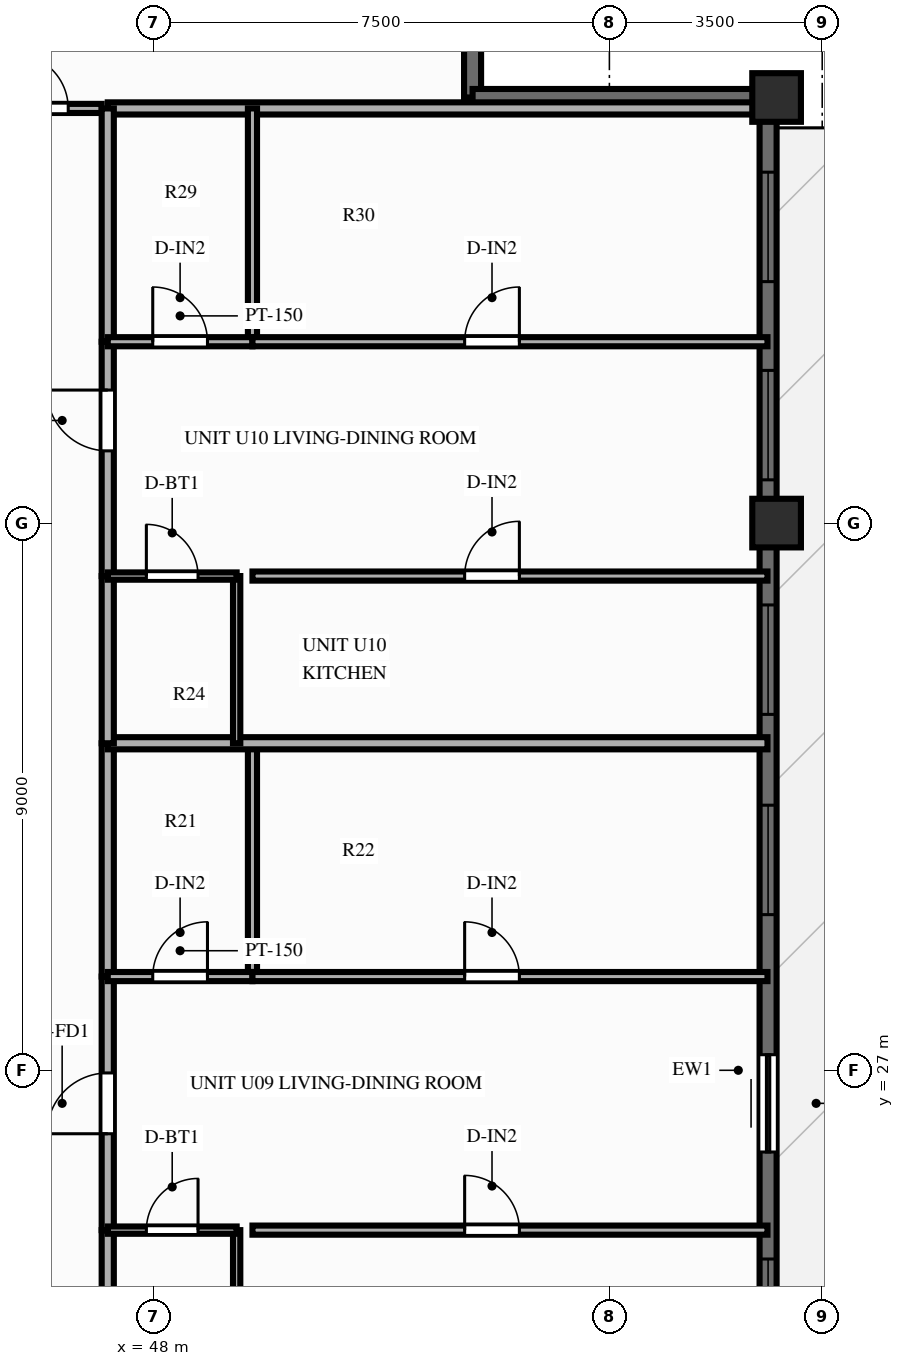
"""IFC4 building model, lengths in metres.
Left out: names, types, materials, properties, quantities, classifications, styles, units other than length and angle.
Written with IfcOpenShell. Run it as: python <this file> out.ifc"""

import sys

from ifc_helpers import new_model, si_unit, direction, frame, frame_2d, origin, origin_2d, place, context, subcontext, project, spatial, rectangle, extrude, source, transform, mapped, element, fill, save


model = new_model("IFC4")
c1 = context("Model", 3, precision=1e-05, world=origin(), true_north=direction((0.0, 1.0)))
c2 = subcontext(c1, "Body", "Model", "MODEL_VIEW")
j1 = project(units=[si_unit("LENGTHUNIT", "METRE"), si_unit("PLANEANGLEUNIT", "RADIAN")], contexts=[c1])
p1 = place(None, origin())
s1 = spatial("IfcSite", under=j1, at=p1, CompositionType="ELEMENT")
p2 = place(p1, origin())
s2 = spatial("IfcBuilding", under=s1, at=p2, CompositionType="ELEMENT")
p3 = place(p2, frame((0.0, 0.0, 172.9)))
s3 = spatial("IfcBuildingStorey", under=s2, at=p3, CompositionType="ELEMENT", Elevation=172.9)
m1 = source(origin(), c2, "Body", "SweptSolid", [
    extrude(rectangle(XDim=0.8, YDim=0.8, at=origin_2d()), origin(), (0.0, 0.0, 1.0), 3.9),
])
for number, where, z_axis, x_axis in (
    (1, (58.25, 36.0, 0.0), (0.0, 0.0, 1.0), (1.0, 0.0, 0.0)),
    (2, (58.25, 43.0, 0.0), (0.0, 0.0, 1.0), (1.0, 0.0, 0.0)),
):
    element("IfcColumn", number, at=place(p3, frame(where, z_axis=z_axis, x_axis=x_axis)), inside=s3, PredefinedType="COLUMN", context=c2, shape_type="MappedRepresentation", body=[
        mapped(m1, transform((0.0, 0.0, 0.0), scale=1.0)),
    ])
p4 = place(p3, frame((58.11, 11.0, 0.0), z_axis=(0.0, 0.0, 1.0), x_axis=(0.0, 1.0, 0.0)))
e3 = element("IfcWall", 3, at=p4, inside=s3, PredefinedType="SOLIDWALL", context=c2, shape_type="SweptSolid", body=[
    extrude(rectangle(XDim=32.0, YDim=0.28, at=frame_2d((16.0, 0.0))), origin(), (0.0, 0.0, 1.0), 2.79),
])
p5 = place(p4, frame((0.685, 0.0, 0.85)))
e4 = element("IfcOpeningElement", 4, at=p5, cuts=e3, PredefinedType="OPENING", context=c2, shape_type="SweptSolid", body=[
    extrude(rectangle(XDim=1.8, YDim=1.65, at=frame_2d((0.9, 0.825))), frame((0.0, 0.152, 0.0), z_axis=(0.0, -1.0, 0.0), x_axis=(1.0, 0.0, 0.0)), (0.0, 0.0, 1.0), 0.304),
])
p6 = place(p4, frame((3.945, 0.0, 0.85)))
e5 = element("IfcOpeningElement", 5, at=p6, cuts=e3, PredefinedType="OPENING", context=c2, shape_type="SweptSolid", body=[
    extrude(rectangle(XDim=1.8, YDim=1.65, at=frame_2d((0.9, 0.825))), frame((0.0, 0.152, 0.0), z_axis=(0.0, -1.0, 0.0), x_axis=(1.0, 0.0, 0.0)), (0.0, 0.0, 1.0), 0.304),
])
p7 = place(p4, frame((8.051, 0.0, 0.85)))
e6 = element("IfcOpeningElement", 6, at=p7, cuts=e3, PredefinedType="OPENING", context=c2, shape_type="SweptSolid", body=[
    extrude(rectangle(XDim=1.8, YDim=1.65, at=frame_2d((0.9, 0.825))), frame((0.0, 0.152, 0.0), z_axis=(0.0, -1.0, 0.0), x_axis=(1.0, 0.0, 0.0)), (0.0, 0.0, 1.0), 0.304),
])
p8 = place(p4, frame((11.096, 0.0, 0.85)))
e7 = element("IfcOpeningElement", 7, at=p8, cuts=e3, PredefinedType="OPENING", context=c2, shape_type="SweptSolid", body=[
    extrude(rectangle(XDim=1.8, YDim=1.65, at=frame_2d((0.9, 0.825))), frame((0.0, 0.152, 0.0), z_axis=(0.0, -1.0, 0.0), x_axis=(1.0, 0.0, 0.0)), (0.0, 0.0, 1.0), 0.304),
])
p9 = place(p4, frame((16.257, 0.0, 0.0), z_axis=(0.0, 0.0, 1.0), x_axis=(-1.0, 0.0, 0.0)))
e8 = element("IfcOpeningElement", 8, at=p9, cuts=e3, PredefinedType="OPENING", context=c2, shape_type="SweptSolid", body=[
    extrude(rectangle(XDim=1.6, YDim=2.15, at=frame_2d((0.8, 1.075))), frame((0.0, 0.152, 0.0), z_axis=(0.0, -1.0, 0.0), x_axis=(1.0, 0.0, 0.0)), (0.0, 0.0, 1.0), 0.304),
])
p10 = place(p4, frame((18.56, 0.0, 0.85)))
e9 = element("IfcOpeningElement", 9, at=p10, cuts=e3, PredefinedType="OPENING", context=c2, shape_type="SweptSolid", body=[
    extrude(rectangle(XDim=1.8, YDim=1.65, at=frame_2d((0.9, 0.825))), frame((0.0, 0.152, 0.0), z_axis=(0.0, -1.0, 0.0), x_axis=(1.0, 0.0, 0.0)), (0.0, 0.0, 1.0), 0.304),
])
p11 = place(p4, frame((21.854, 0.0, 0.85)))
e10 = element("IfcOpeningElement", 10, at=p11, cuts=e3, PredefinedType="OPENING", context=c2, shape_type="SweptSolid", body=[
    extrude(rectangle(XDim=1.8, YDim=1.65, at=frame_2d((0.9, 0.825))), frame((0.0, 0.152, 0.0), z_axis=(0.0, -1.0, 0.0), x_axis=(1.0, 0.0, 0.0)), (0.0, 0.0, 1.0), 0.304),
])
p12 = place(p4, frame((25.711, 0.0, 0.85)))
e11 = element("IfcOpeningElement", 11, at=p12, cuts=e3, PredefinedType="OPENING", context=c2, shape_type="SweptSolid", body=[
    extrude(rectangle(XDim=1.8, YDim=1.65, at=frame_2d((0.9, 0.825))), frame((0.0, 0.152, 0.0), z_axis=(0.0, -1.0, 0.0), x_axis=(1.0, 0.0, 0.0)), (0.0, 0.0, 1.0), 0.304),
])
p13 = place(p4, frame((28.971, 0.0, 0.85)))
e12 = element("IfcOpeningElement", 12, at=p13, cuts=e3, PredefinedType="OPENING", context=c2, shape_type="SweptSolid", body=[
    extrude(rectangle(XDim=1.8, YDim=1.65, at=frame_2d((0.9, 0.825))), frame((0.0, 0.152, 0.0), z_axis=(0.0, -1.0, 0.0), x_axis=(1.0, 0.0, 0.0)), (0.0, 0.0, 1.0), 0.304),
])
for number, where, z_axis, x_axis in (
    (13, (53.25, 43.0, 0.0), (0.0, 0.0, 1.0), (0.0, 1.0, 0.0)),
    (14, (53.25, 43.0, 0.0), (0.0, 0.0, 1.0), (1.0, 0.0, 0.0)),
):
    element("IfcWall", number, at=place(p3, frame(where, z_axis=z_axis, x_axis=x_axis)), inside=s3, PredefinedType="SOLIDWALL", context=c2, shape_type="SweptSolid", body=[
        extrude(rectangle(XDim=4.92, YDim=0.28, at=frame_2d((2.46, 0.0))), origin(), (0.0, 0.0, 1.0), 2.79),
    ])
p14 = place(p3, frame((44.82, 42.82, 0.0), z_axis=(0.0, 0.0, 1.0), x_axis=(1.0, 0.0, 0.0)))
e15 = element("IfcWall", 15, at=p14, inside=s3, PredefinedType="PARTITIONING", context=c2, shape_type="SweptSolid", body=[
    extrude(rectangle(XDim=2.33, YDim=0.15, at=frame_2d((1.165, 0.0))), origin(), (0.0, 0.0, 1.0), 3.69),
])
p15 = place(p14, frame((0.88, 0.0, 0.0)))
e16 = element("IfcOpeningElement", 16, at=p15, cuts=e15, PredefinedType="OPENING", context=c2, shape_type="SweptSolid", body=[
    extrude(rectangle(XDim=0.9, YDim=2.1, at=frame_2d((0.45, 1.05))), frame((0.0, 0.087, 0.0), z_axis=(0.0, -1.0, 0.0), x_axis=(1.0, 0.0, 0.0)), (0.0, 0.0, 1.0), 0.174),
])
p16 = place(p3, frame((47.25, 42.82, 0.0), z_axis=(0.0, 0.0, 1.0), x_axis=(1.0, 0.0, 0.0)))
e17 = element("IfcWall", 17, at=p16, inside=s3, PredefinedType="PARTITIONING", context=c2, shape_type="SweptSolid", body=[
    extrude(rectangle(XDim=10.85, YDim=0.2, at=frame_2d((5.425, 0.0))), origin(), (0.0, 0.0, 1.0), 3.69),
])
p17 = place(p3, frame((47.25, 21.621, 0.0), z_axis=(0.0, 0.0, 1.0), x_axis=(0.0, 1.0, 0.0)))
e18 = element("IfcWall", 18, at=p17, inside=s3, PredefinedType="PARTITIONING", context=c2, shape_type="SweptSolid", body=[
    extrude(rectangle(XDim=2.75, YDim=0.2, at=frame_2d((1.375, 0.0))), origin(), (0.0, 0.0, 1.0), 3.69),
])
p18 = place(p3, frame((47.25, 24.371, 0.0), z_axis=(0.0, 0.0, 1.0), x_axis=(0.0, 1.0, 0.0)))
e19 = element("IfcWall", 19, at=p18, inside=s3, PredefinedType="PARTITIONING", context=c2, shape_type="SweptSolid", body=[
    extrude(rectangle(XDim=4.171, YDim=0.2, at=frame_2d((2.085, 0.0))), origin(), (0.0, 0.0, 1.0), 3.69),
])
p19 = place(p18, frame((1.585, 0.0, 0.0)))
e20 = element("IfcOpeningElement", 20, at=p19, cuts=e19, PredefinedType="OPENING", context=c2, shape_type="SweptSolid", body=[
    extrude(rectangle(XDim=1.0, YDim=2.15, at=frame_2d((0.5, 1.075))), frame((0.0, 0.112, 0.0), z_axis=(0.0, -1.0, 0.0), x_axis=(1.0, 0.0, 0.0)), (0.0, 0.0, 1.0), 0.224),
])
p20 = place(p3, frame((47.25, 28.542, 0.0), z_axis=(0.0, 0.0, 1.0), x_axis=(0.0, 1.0, 0.0)))
e21 = element("IfcWall", 21, at=p20, inside=s3, PredefinedType="PARTITIONING", context=c2, shape_type="SweptSolid", body=[
    extrude(rectangle(XDim=3.837, YDim=0.2, at=frame_2d((1.918, 0.0))), origin(), (0.0, 0.0, 1.0), 3.69),
])
p21 = place(p3, frame((49.37, 21.621, 0.0), z_axis=(0.0, 0.0, 1.0), x_axis=(0.0, 1.0, 0.0)))
e22 = element("IfcWall", 22, at=p21, inside=s3, PredefinedType="PARTITIONING", context=c2, shape_type="SweptSolid", body=[
    extrude(rectangle(XDim=2.75, YDim=0.12, at=frame_2d((1.375, 0.0))), origin(), (0.0, 0.0, 1.0), 3.69),
])
p22 = place(p3, frame((49.63, 28.542, 0.0), z_axis=(0.0, 0.0, 1.0), x_axis=(0.0, 1.0, 0.0)))
e23 = element("IfcWall", 23, at=p22, inside=s3, PredefinedType="PARTITIONING", context=c2, shape_type="SweptSolid", body=[
    extrude(rectangle(XDim=3.837, YDim=0.15, at=frame_2d((1.918, 0.0))), origin(), (0.0, 0.0, 1.0), 3.69),
])
p23 = place(p3, frame((47.25, 24.371, 0.0), z_axis=(0.0, 0.0, 1.0), x_axis=(1.0, 0.0, 0.0)))
e24 = element("IfcWall", 24, at=p23, inside=s3, PredefinedType="PARTITIONING", context=c2, shape_type="SweptSolid", body=[
    extrude(rectangle(XDim=2.12, YDim=0.12, at=frame_2d((1.06, 0.0))), origin(), (0.0, 0.0, 1.0), 3.69),
])
p24 = place(p23, frame((0.635, 0.0, 0.0)))
e25 = element("IfcOpeningElement", 25, at=p24, cuts=e24, PredefinedType="OPENING", context=c2, shape_type="SweptSolid", body=[
    extrude(rectangle(XDim=0.85, YDim=2.05, at=frame_2d((0.425, 1.025))), frame((0.0, 0.072, 0.0), z_axis=(0.0, -1.0, 0.0), x_axis=(1.0, 0.0, 0.0)), (0.0, 0.0, 1.0), 0.144),
])
p25 = place(p3, frame((49.63, 24.371, 0.0), z_axis=(0.0, 0.0, 1.0), x_axis=(1.0, 0.0, 0.0)))
e26 = element("IfcWall", 26, at=p25, inside=s3, PredefinedType="PARTITIONING", context=c2, shape_type="SweptSolid", body=[
    extrude(rectangle(XDim=8.47, YDim=0.15, at=frame_2d((4.235, 0.0))), origin(), (0.0, 0.0, 1.0), 3.69),
])
p26 = place(p25, frame((3.49, 0.0, 0.0)))
e27 = element("IfcOpeningElement", 27, at=p26, cuts=e26, PredefinedType="OPENING", context=c2, shape_type="SweptSolid", body=[
    extrude(rectangle(XDim=0.9, YDim=2.1, at=frame_2d((0.45, 1.05))), frame((0.0, 0.087, 0.0), z_axis=(0.0, -1.0, 0.0), x_axis=(1.0, 0.0, 0.0)), (0.0, 0.0, 1.0), 0.174),
])
p27 = place(p3, frame((47.25, 28.542, 0.0), z_axis=(0.0, 0.0, 1.0), x_axis=(1.0, 0.0, 0.0)))
e28 = element("IfcWall", 28, at=p27, inside=s3, PredefinedType="PARTITIONING", context=c2, shape_type="SweptSolid", body=[
    extrude(rectangle(XDim=2.38, YDim=0.15, at=frame_2d((1.19, 0.0))), origin(), (0.0, 0.0, 1.0), 3.69),
])
p28 = place(p27, frame((0.74, 0.0, 0.0)))
e29 = element("IfcOpeningElement", 29, at=p28, cuts=e28, PredefinedType="OPENING", context=c2, shape_type="SweptSolid", body=[
    extrude(rectangle(XDim=0.9, YDim=2.1, at=frame_2d((0.45, 1.05))), frame((0.0, 0.087, 0.0), z_axis=(0.0, -1.0, 0.0), x_axis=(1.0, 0.0, 0.0)), (0.0, 0.0, 1.0), 0.174),
])
p29 = place(p3, frame((49.63, 28.542, 0.0), z_axis=(0.0, 0.0, 1.0), x_axis=(1.0, 0.0, 0.0)))
e30 = element("IfcWall", 30, at=p29, inside=s3, PredefinedType="PARTITIONING", context=c2, shape_type="SweptSolid", body=[
    extrude(rectangle(XDim=8.47, YDim=0.15, at=frame_2d((4.235, 0.0))), origin(), (0.0, 0.0, 1.0), 3.69),
])
p30 = place(p29, frame((3.49, 0.0, 0.0)))
e31 = element("IfcOpeningElement", 31, at=p30, cuts=e30, PredefinedType="OPENING", context=c2, shape_type="SweptSolid", body=[
    extrude(rectangle(XDim=0.9, YDim=2.1, at=frame_2d((0.45, 1.05))), frame((0.0, 0.087, 0.0), z_axis=(0.0, -1.0, 0.0), x_axis=(1.0, 0.0, 0.0)), (0.0, 0.0, 1.0), 0.174),
])
p31 = place(p3, frame((47.25, 32.379, 0.0), z_axis=(0.0, 0.0, 1.0), x_axis=(1.0, 0.0, 0.0)))
e32 = element("IfcWall", 32, at=p31, inside=s3, PredefinedType="PARTITIONING", context=c2, shape_type="SweptSolid", body=[
    extrude(rectangle(XDim=10.85, YDim=0.2, at=frame_2d((5.425, 0.0))), origin(), (0.0, 0.0, 1.0), 3.29),
])
p32 = place(p3, frame((47.25, 32.379, 0.0), z_axis=(0.0, 0.0, 1.0), x_axis=(0.0, 1.0, 0.0)))
e33 = element("IfcWall", 33, at=p32, inside=s3, PredefinedType="PARTITIONING", context=c2, shape_type="SweptSolid", body=[
    extrude(rectangle(XDim=2.75, YDim=0.2, at=frame_2d((1.375, 0.0))), origin(), (0.0, 0.0, 1.0), 3.69),
])
p33 = place(p3, frame((47.25, 35.129, 0.0), z_axis=(0.0, 0.0, 1.0), x_axis=(0.0, 1.0, 0.0)))
e34 = element("IfcWall", 34, at=p33, inside=s3, PredefinedType="PARTITIONING", context=c2, shape_type="SweptSolid", body=[
    extrude(rectangle(XDim=3.854, YDim=0.2, at=frame_2d((1.927, 0.0))), origin(), (0.0, 0.0, 1.0), 3.69),
])
p34 = place(p33, frame((2.059, 0.0, 0.0)))
e35 = element("IfcOpeningElement", 35, at=p34, cuts=e34, PredefinedType="OPENING", context=c2, shape_type="SweptSolid", body=[
    extrude(rectangle(XDim=1.0, YDim=2.15, at=frame_2d((0.5, 1.075))), frame((0.0, 0.112, 0.0), z_axis=(0.0, -1.0, 0.0), x_axis=(1.0, 0.0, 0.0)), (0.0, 0.0, 1.0), 0.224),
])
p35 = place(p3, frame((47.25, 38.983, 0.0), z_axis=(0.0, 0.0, 1.0), x_axis=(0.0, 1.0, 0.0)))
e36 = element("IfcWall", 36, at=p35, inside=s3, PredefinedType="PARTITIONING", context=c2, shape_type="SweptSolid", body=[
    extrude(rectangle(XDim=3.837, YDim=0.2, at=frame_2d((1.918, 0.0))), origin(), (0.0, 0.0, 1.0), 3.69),
])
p36 = place(p3, frame((49.37, 32.379, 0.0), z_axis=(0.0, 0.0, 1.0), x_axis=(0.0, 1.0, 0.0)))
e37 = element("IfcWall", 37, at=p36, inside=s3, PredefinedType="PARTITIONING", context=c2, shape_type="SweptSolid", body=[
    extrude(rectangle(XDim=2.75, YDim=0.12, at=frame_2d((1.375, 0.0))), origin(), (0.0, 0.0, 1.0), 3.69),
])
p37 = place(p3, frame((49.63, 38.983, 0.0), z_axis=(0.0, 0.0, 1.0), x_axis=(0.0, 1.0, 0.0)))
e38 = element("IfcWall", 38, at=p37, inside=s3, PredefinedType="PARTITIONING", context=c2, shape_type="SweptSolid", body=[
    extrude(rectangle(XDim=3.837, YDim=0.15, at=frame_2d((1.918, 0.0))), origin(), (0.0, 0.0, 1.0), 3.69),
])
p38 = place(p3, frame((47.25, 35.129, 0.0), z_axis=(0.0, 0.0, 1.0), x_axis=(1.0, 0.0, 0.0)))
e39 = element("IfcWall", 39, at=p38, inside=s3, PredefinedType="PARTITIONING", context=c2, shape_type="SweptSolid", body=[
    extrude(rectangle(XDim=2.12, YDim=0.12, at=frame_2d((1.06, 0.0))), origin(), (0.0, 0.0, 1.0), 3.69),
])
p39 = place(p38, frame((0.635, 0.0, 0.0)))
e40 = element("IfcOpeningElement", 40, at=p39, cuts=e39, PredefinedType="OPENING", context=c2, shape_type="SweptSolid", body=[
    extrude(rectangle(XDim=0.85, YDim=2.05, at=frame_2d((0.425, 1.025))), frame((0.0, 0.072, 0.0), z_axis=(0.0, -1.0, 0.0), x_axis=(1.0, 0.0, 0.0)), (0.0, 0.0, 1.0), 0.144),
])
p40 = place(p3, frame((49.63, 35.129, 0.0), z_axis=(0.0, 0.0, 1.0), x_axis=(1.0, 0.0, 0.0)))
e41 = element("IfcWall", 41, at=p40, inside=s3, PredefinedType="PARTITIONING", context=c2, shape_type="SweptSolid", body=[
    extrude(rectangle(XDim=8.47, YDim=0.15, at=frame_2d((4.235, 0.0))), origin(), (0.0, 0.0, 1.0), 3.69),
])
p41 = place(p40, frame((3.49, 0.0, 0.0)))
e42 = element("IfcOpeningElement", 42, at=p41, cuts=e41, PredefinedType="OPENING", context=c2, shape_type="SweptSolid", body=[
    extrude(rectangle(XDim=0.9, YDim=2.1, at=frame_2d((0.45, 1.05))), frame((0.0, 0.087, 0.0), z_axis=(0.0, -1.0, 0.0), x_axis=(1.0, 0.0, 0.0)), (0.0, 0.0, 1.0), 0.174),
])
p42 = place(p3, frame((47.25, 38.983, 0.0), z_axis=(0.0, 0.0, 1.0), x_axis=(1.0, 0.0, 0.0)))
e43 = element("IfcWall", 43, at=p42, inside=s3, PredefinedType="PARTITIONING", context=c2, shape_type="SweptSolid", body=[
    extrude(rectangle(XDim=2.38, YDim=0.15, at=frame_2d((1.19, 0.0))), origin(), (0.0, 0.0, 1.0), 3.69),
])
p43 = place(p42, frame((0.74, 0.0, 0.0)))
e44 = element("IfcOpeningElement", 44, at=p43, cuts=e43, PredefinedType="OPENING", context=c2, shape_type="SweptSolid", body=[
    extrude(rectangle(XDim=0.9, YDim=2.1, at=frame_2d((0.45, 1.05))), frame((0.0, 0.087, 0.0), z_axis=(0.0, -1.0, 0.0), x_axis=(1.0, 0.0, 0.0)), (0.0, 0.0, 1.0), 0.174),
])
p44 = place(p3, frame((49.63, 38.983, 0.0), z_axis=(0.0, 0.0, 1.0), x_axis=(1.0, 0.0, 0.0)))
e45 = element("IfcWall", 45, at=p44, inside=s3, PredefinedType="PARTITIONING", context=c2, shape_type="SweptSolid", body=[
    extrude(rectangle(XDim=8.47, YDim=0.15, at=frame_2d((4.235, 0.0))), origin(), (0.0, 0.0, 1.0), 3.69),
])
p45 = place(p44, frame((3.49, 0.0, 0.0)))
e46 = element("IfcOpeningElement", 46, at=p45, cuts=e45, PredefinedType="OPENING", context=c2, shape_type="SweptSolid", body=[
    extrude(rectangle(XDim=0.9, YDim=2.1, at=frame_2d((0.45, 1.05))), frame((0.0, 0.087, 0.0), z_axis=(0.0, -1.0, 0.0), x_axis=(1.0, 0.0, 0.0)), (0.0, 0.0, 1.0), 0.174),
])
m2 = source(origin(), c2, "Body", "SweptSolid", [
    extrude(rectangle(XDim=1.8, YDim=1.65, at=frame_2d((0.9, 0.825))), frame((0.0, 0.03, 0.0), z_axis=(0.0, -1.0, 0.0), x_axis=(1.0, 0.0, 0.0)), (0.0, 0.0, 1.0), 0.06),
])
p46 = place(p8, origin())
e47 = element("IfcWindow", 47, at=p46, inside=s3, PartitioningType="SINGLE_PANEL", PredefinedType="WINDOW", context=c2, shape_type="MappedRepresentation", body=[
    mapped(m2, transform((0.0, 0.0, 0.0), scale=1.0)),
])
fill(e7, e47)
m3 = source(origin(), c2, "Body", "SweptSolid", [
    extrude(rectangle(XDim=1.6, YDim=2.15, at=frame_2d((0.8, 1.075))), frame((0.0, 0.025, 0.0), z_axis=(0.0, -1.0, 0.0), x_axis=(1.0, 0.0, 0.0)), (0.0, 0.0, 1.0), 0.05),
])
p47 = place(p9, origin())
e48 = element("IfcDoor", 48, at=p47, inside=s3, OperationType="SLIDING_TO_LEFT", PredefinedType="DOOR", context=c2, shape_type="MappedRepresentation", body=[
    mapped(m3, transform((0.0, 0.0, 0.0), scale=1.0)),
])
fill(e8, e48)
p48 = place(p10, origin())
e49 = element("IfcWindow", 49, at=p48, inside=s3, PartitioningType="SINGLE_PANEL", PredefinedType="WINDOW", context=c2, shape_type="MappedRepresentation", body=[
    mapped(m2, transform((0.0, 0.0, 0.0), scale=1.0)),
])
fill(e9, e49)
p49 = place(p11, origin())
e50 = element("IfcWindow", 50, at=p49, inside=s3, PartitioningType="SINGLE_PANEL", PredefinedType="WINDOW", context=c2, shape_type="MappedRepresentation", body=[
    mapped(m2, transform((0.0, 0.0, 0.0), scale=1.0)),
])
fill(e10, e50)
p50 = place(p12, origin())
e51 = element("IfcWindow", 51, at=p50, inside=s3, PartitioningType="SINGLE_PANEL", PredefinedType="WINDOW", context=c2, shape_type="MappedRepresentation", body=[
    mapped(m2, transform((0.0, 0.0, 0.0), scale=1.0)),
])
fill(e11, e51)
p51 = place(p13, origin())
e52 = element("IfcWindow", 52, at=p51, inside=s3, PartitioningType="SINGLE_PANEL", PredefinedType="WINDOW", context=c2, shape_type="MappedRepresentation", body=[
    mapped(m2, transform((0.0, 0.0, 0.0), scale=1.0)),
])
fill(e12, e52)
m4 = source(origin(), c2, "Body", "SweptSolid", [
    extrude(rectangle(XDim=0.9, YDim=2.1, at=frame_2d((0.45, 1.05))), frame((0.0, 0.025, 0.0), z_axis=(0.0, -1.0, 0.0), x_axis=(1.0, 0.0, 0.0)), (0.0, 0.0, 1.0), 0.05),
])
p52 = place(p15, origin())
e53 = element("IfcDoor", 53, at=p52, inside=s3, OperationType="SINGLE_SWING_LEFT", PredefinedType="DOOR", context=c2, shape_type="MappedRepresentation", body=[
    mapped(m4, transform((0.0, 0.0, 0.0), scale=1.0)),
])
fill(e16, e53)
m5 = source(origin(), c2, "Body", "SweptSolid", [
    extrude(rectangle(XDim=1.0, YDim=2.15, at=frame_2d((0.5, 1.075))), frame((0.0, 0.025, 0.0), z_axis=(0.0, -1.0, 0.0), x_axis=(1.0, 0.0, 0.0)), (0.0, 0.0, 1.0), 0.05),
])
p53 = place(p19, origin())
e54 = element("IfcDoor", 54, at=p53, inside=s3, OperationType="SINGLE_SWING_LEFT", PredefinedType="DOOR", context=c2, shape_type="MappedRepresentation", body=[
    mapped(m5, transform((0.0, 0.0, 0.0), scale=1.0)),
])
fill(e20, e54)
m6 = source(origin(), c2, "Body", "SweptSolid", [
    extrude(rectangle(XDim=0.85, YDim=2.05, at=frame_2d((0.425, 1.025))), frame((0.0, 0.025, 0.0), z_axis=(0.0, -1.0, 0.0), x_axis=(1.0, 0.0, 0.0)), (0.0, 0.0, 1.0), 0.05),
])
p54 = place(p24, origin())
e55 = element("IfcDoor", 55, at=p54, inside=s3, OperationType="SINGLE_SWING_RIGHT", PredefinedType="DOOR", context=c2, shape_type="MappedRepresentation", body=[
    mapped(m6, transform((0.0, 0.0, 0.0), scale=1.0)),
])
fill(e25, e55)
p55 = place(p26, origin())
e56 = element("IfcDoor", 56, at=p55, inside=s3, OperationType="SINGLE_SWING_LEFT", PredefinedType="DOOR", context=c2, shape_type="MappedRepresentation", body=[
    mapped(m4, transform((0.0, 0.0, 0.0), scale=1.0)),
])
fill(e27, e56)
p56 = place(p28, origin())
e57 = element("IfcDoor", 57, at=p56, inside=s3, OperationType="SINGLE_SWING_RIGHT", PredefinedType="DOOR", context=c2, shape_type="MappedRepresentation", body=[
    mapped(m4, transform((0.0, 0.0, 0.0), scale=1.0)),
])
fill(e29, e57)
p57 = place(p30, origin())
e58 = element("IfcDoor", 58, at=p57, inside=s3, OperationType="SINGLE_SWING_LEFT", PredefinedType="DOOR", context=c2, shape_type="MappedRepresentation", body=[
    mapped(m4, transform((0.0, 0.0, 0.0), scale=1.0)),
])
fill(e31, e58)
p58 = place(p34, origin())
e59 = element("IfcDoor", 59, at=p58, inside=s3, OperationType="SINGLE_SWING_RIGHT", PredefinedType="DOOR", context=c2, shape_type="MappedRepresentation", body=[
    mapped(m5, transform((0.0, 0.0, 0.0), scale=1.0)),
])
fill(e35, e59)
p59 = place(p39, origin())
e60 = element("IfcDoor", 60, at=p59, inside=s3, OperationType="SINGLE_SWING_LEFT", PredefinedType="DOOR", context=c2, shape_type="MappedRepresentation", body=[
    mapped(m6, transform((0.0, 0.0, 0.0), scale=1.0)),
])
fill(e40, e60)
p60 = place(p41, origin())
e61 = element("IfcDoor", 61, at=p60, inside=s3, OperationType="SINGLE_SWING_RIGHT", PredefinedType="DOOR", context=c2, shape_type="MappedRepresentation", body=[
    mapped(m4, transform((0.0, 0.0, 0.0), scale=1.0)),
])
fill(e42, e61)
p61 = place(p43, origin())
e62 = element("IfcDoor", 62, at=p61, inside=s3, OperationType="SINGLE_SWING_LEFT", PredefinedType="DOOR", context=c2, shape_type="MappedRepresentation", body=[
    mapped(m4, transform((0.0, 0.0, 0.0), scale=1.0)),
])
fill(e44, e62)
p62 = place(p45, origin())
e63 = element("IfcDoor", 63, at=p62, inside=s3, OperationType="SINGLE_SWING_RIGHT", PredefinedType="DOOR", context=c2, shape_type="MappedRepresentation", body=[
    mapped(m4, transform((0.0, 0.0, 0.0), scale=1.0)),
])
fill(e46, e63)
save(model, sys.argv[1])
